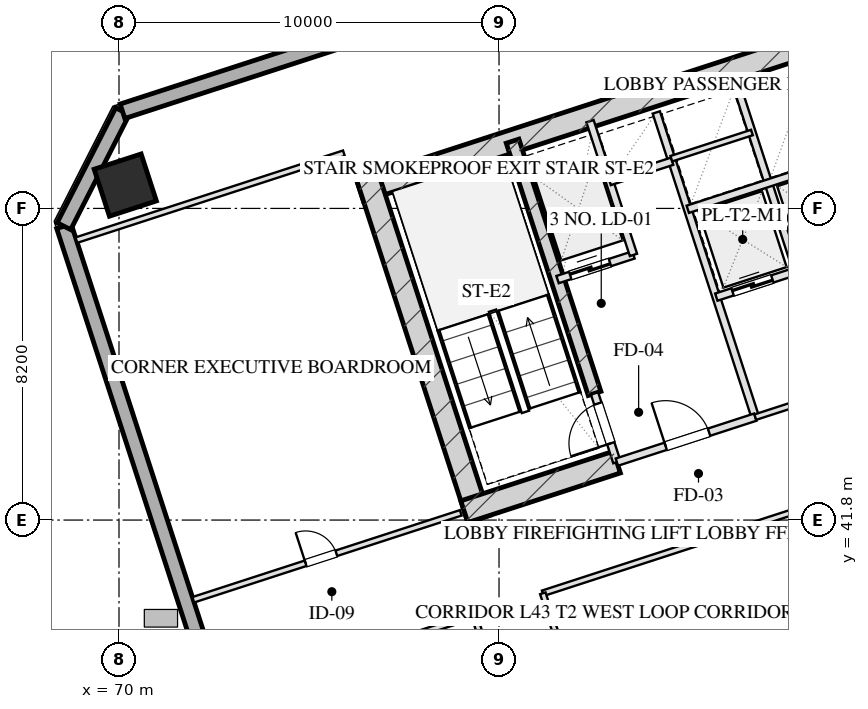
"""IFC4 building model, lengths in metres.
Left out: names, types, materials, properties, quantities, classifications, styles, units other than length and angle.
Written with IfcOpenShell. Run it as: python <this file> out.ifc"""

import sys

from ifc_helpers import new_model, si_unit, direction, frame, frame_2d, origin, origin_2d, place, context, subcontext, project, spatial, rectangle, hollow_rectangle, extrude, element, fill, save


model = new_model("IFC4")
c1 = context("Model", 3, precision=1e-05, world=origin(), true_north=direction((0.0, 1.0)))
c2 = subcontext(c1, "Body", "Model", "MODEL_VIEW")
j1 = project(units=[si_unit("LENGTHUNIT", "METRE"), si_unit("PLANEANGLEUNIT", "RADIAN")], contexts=[c1])
p1 = place(None, origin())
s1 = spatial("IfcSite", under=j1, at=p1, CompositionType="ELEMENT")
p2 = place(p1, origin())
s2 = spatial("IfcBuilding", under=s1, at=p2, CompositionType="ELEMENT")
p3 = place(p2, frame((0.0, 0.0, 163.3)))
s3 = spatial("IfcBuildingStorey", under=s2, at=p3, CompositionType="ELEMENT", Elevation=163.3)
p4 = place(p3, frame((76.344, 50.466, 0.0), z_axis=(0.0, 0.0, 1.0), x_axis=(0.951055727519, 0.309019421968, 0.0)))
e1 = element("IfcWall", 1, at=p4, inside=s3, PredefinedType="SHEAR", context=c2, shape_type="SweptSolid", body=[
    extrude(rectangle(XDim=16.4, YDim=0.6, at=frame_2d((8.2, 0.0))), origin(), (0.0, 0.0, 1.0), 3.45),
])
p5 = place(p3, frame((79.466, 41.828, 0.0), z_axis=(0.0, 0.0, 1.0), x_axis=(-0.309041232772, 0.951048640421, 0.0)))
e2 = element("IfcWall", 2, at=p5, inside=s3, PredefinedType="SHEAR", context=c2, shape_type="SweptSolid", body=[
    extrude(rectangle(XDim=9.48, YDim=0.6, at=frame_2d((4.74, 0.0))), origin(), (0.0, 0.0, 1.0), 3.45),
])
p6 = place(p3, frame((82.514, 45.131, 0.0), z_axis=(0.0, 0.0, 1.0), x_axis=(-0.308988790936, 0.951065679686, 0.0)))
e3 = element("IfcWall", 3, at=p6, inside=s3, PredefinedType="SHEAR", context=c2, shape_type="SweptSolid", body=[
    extrude(rectangle(XDim=6.98, YDim=0.35, at=frame_2d((3.49, 0.0))), origin(), (0.0, 0.0, 1.0), 3.45),
])
p7 = place(p3, frame((79.087, 42.021, 0.0), z_axis=(0.0, 0.0, 1.0), x_axis=(0.951062550203, 0.3089984233, 0.0)))
e4 = element("IfcWall", 4, at=p7, inside=s3, PredefinedType="SHEAR", context=c2, shape_type="SweptSolid", body=[
    extrude(rectangle(XDim=4.22, YDim=0.6, at=frame_2d((2.11, 0.0))), origin(), (0.0, 0.0, 1.0), 3.45),
])
p8 = place(p3, frame((70.165, 50.614, 0.0), z_axis=(0.0, 0.0, 1.0), x_axis=(0.951056516295, 0.309016994375, 0.0)))
e5 = element("IfcColumn", 5, at=p8, inside=s3, PredefinedType="COLUMN", context=c2, shape_type="SweptSolid", body=[
    extrude(hollow_rectangle(XDim=1.3, YDim=1.3, WallThickness=0.045, at=origin_2d()), origin(), (0.0, 0.0, 1.0), 3.451),
])
p9 = place(p3, frame((81.776, 8.827, 0.0), z_axis=(0.0, 0.0, 1.0), x_axis=(-0.309014228706, 0.951057414911, 0.0)))
e6 = element("IfcWall", 6, at=p9, inside=s3, PredefinedType="SOLIDWALL", context=c2, shape_type="SweptSolid", body=[
    extrude(rectangle(XDim=42.8, YDim=0.4, at=frame_2d((21.4, 0.0))), origin(), (0.0, 0.0, 1.0), 2.61),
])
p10 = place(p9, frame((23.45, 0.0, 0.0)))
e7 = element("IfcOpeningElement", 7, at=p10, cuts=e6, PredefinedType="OPENING", context=c2, shape_type="SweptSolid", body=[
    extrude(rectangle(XDim=1.1, YDim=2.15, at=frame_2d((0.55, 1.075))), frame((0.0, 0.21, 0.0), z_axis=(0.0, -1.0, 0.0), x_axis=(1.0, 0.0, 0.0)), (0.0, 0.0, 1.0), 0.42),
])
p11 = place(p3, frame((68.551, 49.532, 0.0), z_axis=(0.0, 0.0, 1.0), x_axis=(0.454019523198, 0.890991735402, 0.0)))
e8 = element("IfcWall", 8, at=p11, inside=s3, PredefinedType="SOLIDWALL", context=c2, shape_type="SweptSolid", body=[
    extrude(rectangle(XDim=3.394, YDim=0.4, at=frame_2d((1.697, 0.0))), origin(), (0.0, 0.0, 1.0), 2.61),
])
p12 = place(p3, frame((70.092, 52.556, 0.0), z_axis=(0.0, 0.0, 1.0), x_axis=(0.951057580055, 0.30901372044, 0.0)))
e9 = element("IfcWall", 9, at=p12, inside=s3, PredefinedType="SOLIDWALL", context=c2, shape_type="SweptSolid", body=[
    extrude(rectangle(XDim=26.4, YDim=0.4, at=frame_2d((13.2, 0.0))), origin(), (0.0, 0.0, 1.0), 2.61),
])
p13 = place(p3, frame((83.101, 43.324, 0.0), z_axis=(0.0, 0.0, 1.0), x_axis=(-0.309048298632, 0.951046344356, 0.0)))
e10 = element("IfcWall", 10, at=p13, inside=s3, PredefinedType="PARTITIONING", context=c2, shape_type="SweptSolid", body=[
    extrude(rectangle(XDim=1.9, YDim=0.2, at=frame_2d((0.95, 0.0))), origin(), (0.0, 0.0, 1.0), 3.175),
])
p14 = place(p13, frame((0.52, 0.0, 0.0)))
e11 = element("IfcOpeningElement", 11, at=p14, cuts=e10, PredefinedType="OPENING", context=c2, shape_type="SweptSolid", body=[
    extrude(rectangle(XDim=1.1, YDim=2.05, at=frame_2d((0.55, 1.025))), frame((0.0, 0.11, 0.0), z_axis=(0.0, -1.0, 0.0), x_axis=(1.0, 0.0, 0.0)), (0.0, 0.0, 1.0), 0.22),
])
p15 = place(p3, frame((86.743, 44.508, 0.0), z_axis=(0.0, 0.0, 1.0), x_axis=(-0.309016001439, 0.951056838919, 0.0)))
e12 = element("IfcWall", 12, at=p15, inside=s3, PredefinedType="PARTITIONING", context=c2, shape_type="SweptSolid", body=[
    extrude(rectangle(XDim=8.43, YDim=0.2, at=frame_2d((4.215, 0.0))), origin(), (0.0, 0.0, 1.0), 3.175),
])
p16 = place(p3, frame((83.101, 43.324, 0.0), z_axis=(0.0, 0.0, 1.0), x_axis=(0.951052804469, 0.309028417967, 0.0)))
e13 = element("IfcWall", 13, at=p16, inside=s3, PredefinedType="PARTITIONING", context=c2, shape_type="SweptSolid", body=[
    extrude(rectangle(XDim=3.83, YDim=0.2, at=frame_2d((1.915, 0.0))), origin(), (0.0, 0.0, 1.0), 3.175),
])
p17 = place(p16, frame((1.35, 0.0, 0.0)))
e14 = element("IfcOpeningElement", 14, at=p17, cuts=e13, PredefinedType="OPENING", context=c2, shape_type="SweptSolid", body=[
    extrude(rectangle(XDim=1.2, YDim=2.05, at=frame_2d((0.6, 1.025))), frame((0.0, 0.11, 0.0), z_axis=(0.0, -1.0, 0.0), x_axis=(1.0, 0.0, 0.0)), (0.0, 0.0, 1.0), 0.22),
])
p18 = place(p3, frame((81.54, 48.127, 0.0), z_axis=(0.0, 0.0, 1.0), x_axis=(0.951062257173, 0.308999325213, 0.0)))
e15 = element("IfcWall", 15, at=p18, inside=s3, PredefinedType="PARTITIONING", context=c2, shape_type="SweptSolid", body=[
    extrude(rectangle(XDim=2.1, YDim=0.2, at=frame_2d((1.05, 0.0))), origin(), (0.0, 0.0, 1.0), 3.175),
])
p19 = place(p18, frame((0.35, 0.0, 0.0)))
e16 = element("IfcOpeningElement", 16, at=p19, cuts=e15, PredefinedType="OPENING", context=c2, shape_type="SweptSolid", body=[
    extrude(rectangle(XDim=1.1, YDim=2.05, at=frame_2d((0.55, 1.025))), frame((0.0, 0.11, 0.0), z_axis=(0.0, -1.0, 0.0), x_axis=(1.0, 0.0, 0.0)), (0.0, 0.0, 1.0), 0.22),
])
p20 = place(p3, frame((83.538, 48.776, 0.0), z_axis=(0.0, 0.0, 1.0), x_axis=(-0.3089935693, 0.951064127245, 0.0)))
e17 = element("IfcWall", 17, at=p20, inside=s3, PredefinedType="PARTITIONING", context=c2, shape_type="SweptSolid", body=[
    extrude(rectangle(XDim=3.7, YDim=0.2, at=frame_2d((1.85, 0.0))), origin(), (0.0, 0.0, 1.0), 3.175),
])
p21 = place(p3, frame((82.91, 50.707, 0.0), z_axis=(0.0, 0.0, 1.0), x_axis=(0.951041328149, 0.309063734775, 0.0)))
e18 = element("IfcWall", 18, at=p21, inside=s3, PredefinedType="PARTITIONING", context=c2, shape_type="SweptSolid", body=[
    extrude(rectangle(XDim=1.73, YDim=0.2, at=frame_2d((0.865, 0.0))), origin(), (0.0, 0.0, 1.0), 3.175),
])
p22 = place(p3, frame((86.743, 44.508, 0.0), z_axis=(0.0, 0.0, 1.0), x_axis=(0.951063829732, 0.308994485023, 0.0)))
e19 = element("IfcWall", 19, at=p22, inside=s3, PredefinedType="PARTITIONING", context=c2, shape_type="SweptSolid", body=[
    extrude(rectangle(XDim=4.4, YDim=0.15, at=frame_2d((2.2, 0.0))), origin(), (0.0, 0.0, 1.0), 3.175),
])
p23 = place(p22, frame((1.45, 0.0, 0.0)))
e20 = element("IfcOpeningElement", 20, at=p23, cuts=e19, PredefinedType="OPENING", context=c2, shape_type="SweptSolid", body=[
    extrude(rectangle(XDim=1.5, YDim=2.05, at=frame_2d((0.75, 1.025))), frame((0.0, 0.085, 0.0), z_axis=(0.0, -1.0, 0.0), x_axis=(1.0, 0.0, 0.0)), (0.0, 0.0, 1.0), 0.17),
])
p24 = place(p3, frame((85.718, 47.666, 0.0), z_axis=(0.0, 0.0, 1.0), x_axis=(0.951058531764, 0.30901079133, 0.0)))
e21 = element("IfcWall", 21, at=p24, inside=s3, PredefinedType="PARTITIONING", context=c2, shape_type="SweptSolid", body=[
    extrude(rectangle(XDim=4.4, YDim=0.2, at=frame_2d((2.2, 0.0))), origin(), (0.0, 0.0, 1.0), 3.175),
])
p25 = place(p24, frame((0.45, 0.0, 0.0)))
e22 = element("IfcOpeningElement", 22, at=p25, cuts=e21, PredefinedType="OPENING", context=c2, shape_type="SweptSolid", body=[
    extrude(rectangle(XDim=1.1, YDim=2.05, at=frame_2d((0.55, 1.025))), frame((0.0, 0.11, 0.0), z_axis=(0.0, -1.0, 0.0), x_axis=(1.0, 0.0, 0.0)), (0.0, 0.0, 1.0), 0.22),
])
p26 = place(p24, frame((2.55, 0.0, 0.0)))
e23 = element("IfcOpeningElement", 23, at=p26, cuts=e21, PredefinedType="OPENING", context=c2, shape_type="SweptSolid", body=[
    extrude(rectangle(XDim=1.1, YDim=2.05, at=frame_2d((0.55, 1.025))), frame((0.0, 0.11, 0.0), z_axis=(0.0, -1.0, 0.0), x_axis=(1.0, 0.0, 0.0)), (0.0, 0.0, 1.0), 0.22),
])
p27 = place(p3, frame((87.838, 48.354, 0.0), z_axis=(0.0, 0.0, 1.0), x_axis=(-0.3090093719, 0.951058992953, 0.0)))
e24 = element("IfcWall", 24, at=p27, inside=s3, PredefinedType="PARTITIONING", context=c2, shape_type="SweptSolid", body=[
    extrude(rectangle(XDim=5.11, YDim=0.2, at=frame_2d((2.555, 0.0))), origin(), (0.0, 0.0, 1.0), 3.175),
])
p28 = place(p3, frame((84.967, 49.977, 0.0), z_axis=(0.0, 0.0, 1.0), x_axis=(0.951063829732, 0.308994485023, 0.0)))
e25 = element("IfcWall", 25, at=p28, inside=s3, PredefinedType="PARTITIONING", context=c2, shape_type="SweptSolid", body=[
    extrude(rectangle(XDim=4.4, YDim=0.2, at=frame_2d((2.2, 0.0))), origin(), (0.0, 0.0, 1.0), 3.175),
])
p29 = place(p3, frame((84.534, 51.308, 0.0), z_axis=(0.0, 0.0, 1.0), x_axis=(0.951075093106, 0.308959814982, 0.0)))
e26 = element("IfcWall", 26, at=p29, inside=s3, PredefinedType="PARTITIONING", context=c2, shape_type="SweptSolid", body=[
    extrude(rectangle(XDim=2.23, YDim=0.15, at=frame_2d((1.115, 0.0))), origin(), (0.0, 0.0, 1.0), 3.175),
])
p30 = place(p3, frame((68.88, 49.166, 0.0), z_axis=(0.0, 0.0, 1.0), x_axis=(0.951060977215, 0.309003264738, 0.0)))
e27 = element("IfcWall", 27, at=p30, inside=s3, PredefinedType="PARTITIONING", context=c2, shape_type="SweptSolid", body=[
    extrude(rectangle(XDim=7.4, YDim=0.15, at=frame_2d((3.7, 0.0))), origin(), (0.0, 0.0, 1.0), 3.175),
])
p31 = place(p3, frame((71.955, 39.703, 0.0), z_axis=(0.0, 0.0, 1.0), x_axis=(0.951060977215, 0.309003264738, 0.0)))
e28 = element("IfcWall", 28, at=p31, inside=s3, PredefinedType="PARTITIONING", context=c2, shape_type="SweptSolid", body=[
    extrude(rectangle(XDim=7.4, YDim=0.15, at=frame_2d((3.7, 0.0))), origin(), (0.0, 0.0, 1.0), 3.175),
])
p32 = place(p31, frame((3.108, 0.0, 0.0)))
e29 = element("IfcOpeningElement", 29, at=p32, cuts=e28, PredefinedType="OPENING", context=c2, shape_type="SweptSolid", body=[
    extrude(rectangle(XDim=0.85, YDim=2.05, at=frame_2d((0.425, 1.025))), frame((0.0, 0.085, 0.0), z_axis=(0.0, -1.0, 0.0), x_axis=(1.0, 0.0, 0.0)), (0.0, 0.0, 1.0), 0.17),
])
p33 = place(p3, frame((72.783, 37.154, 0.0), z_axis=(0.0, 0.0, 1.0), x_axis=(0.951051488548, 0.309032467762, 0.0)))
e30 = element("IfcWall", 30, at=p33, inside=s3, PredefinedType="PARTITIONING", context=c2, shape_type="SweptSolid", body=[
    extrude(rectangle(XDim=6.9, YDim=0.15, at=frame_2d((3.45, 0.0))), origin(), (0.0, 0.0, 1.0), 3.175),
])
p34 = place(p3, frame((81.152, 39.873, 0.0), z_axis=(0.0, 0.0, 1.0), x_axis=(0.951057640494, 0.309013534425, 0.0)))
e31 = element("IfcWall", 31, at=p34, inside=s3, PredefinedType="PARTITIONING", context=c2, shape_type="SweptSolid", body=[
    extrude(rectangle(XDim=8.6, YDim=0.15, at=frame_2d((4.3, 0.0))), origin(), (0.0, 0.0, 1.0), 3.175),
])
p35 = place(p3, frame((84.487, 23.46, 0.0), z_axis=(0.0, 0.0, 1.0), x_axis=(-0.30901773025, 0.951056277195, 0.0)))
e32 = element("IfcWall", 32, at=p35, inside=s3, PredefinedType="PARTITIONING", context=c2, shape_type="SweptSolid", body=[
    extrude(rectangle(XDim=16.64, YDim=0.15, at=frame_2d((8.32, 0.0))), origin(), (0.0, 0.0, 1.0), 3.175),
])
p36 = place(p35, frame((1.16, 0.0, 0.0)))
e33 = element("IfcOpeningElement", 33, at=p36, cuts=e32, PredefinedType="OPENING", context=c2, shape_type="SweptSolid", body=[
    extrude(rectangle(XDim=1.0, YDim=2.05, at=frame_2d((0.5, 1.025))), frame((0.0, 0.085, 0.0), z_axis=(0.0, -1.0, 0.0), x_axis=(1.0, 0.0, 0.0)), (0.0, 0.0, 1.0), 0.17),
])
p37 = place(p35, frame((4.72, 0.0, 0.0)))
e34 = element("IfcOpeningElement", 34, at=p37, cuts=e32, PredefinedType="OPENING", context=c2, shape_type="SweptSolid", body=[
    extrude(rectangle(XDim=1.0, YDim=2.05, at=frame_2d((0.5, 1.025))), frame((0.0, 0.085, 0.0), z_axis=(0.0, -1.0, 0.0), x_axis=(1.0, 0.0, 0.0)), (0.0, 0.0, 1.0), 0.17),
])
p38 = place(p35, frame((7.56, 0.0, 0.0)))
e35 = element("IfcOpeningElement", 35, at=p38, cuts=e32, PredefinedType="OPENING", context=c2, shape_type="SweptSolid", body=[
    extrude(rectangle(XDim=1.0, YDim=2.05, at=frame_2d((0.5, 1.025))), frame((0.0, 0.085, 0.0), z_axis=(0.0, -1.0, 0.0), x_axis=(1.0, 0.0, 0.0)), (0.0, 0.0, 1.0), 0.17),
])
p39 = place(p35, frame((10.16, 0.0, 0.0)))
e36 = element("IfcOpeningElement", 36, at=p39, cuts=e32, PredefinedType="OPENING", context=c2, shape_type="SweptSolid", body=[
    extrude(rectangle(XDim=1.05, YDim=2.05, at=frame_2d((0.525, 1.025))), frame((0.0, 0.085, 0.0), z_axis=(0.0, -1.0, 0.0), x_axis=(1.0, 0.0, 0.0)), (0.0, 0.0, 1.0), 0.17),
])
p40 = place(p35, frame((14.48, 0.0, 0.0)))
e37 = element("IfcOpeningElement", 37, at=p40, cuts=e32, PredefinedType="OPENING", context=c2, shape_type="SweptSolid", body=[
    extrude(rectangle(XDim=1.0, YDim=2.05, at=frame_2d((0.5, 1.025))), frame((0.0, 0.085, 0.0), z_axis=(0.0, -1.0, 0.0), x_axis=(1.0, 0.0, 0.0)), (0.0, 0.0, 1.0), 0.17),
])
p41 = place(p3, frame((86.294, 24.048, 0.0), z_axis=(0.0, 0.0, 1.0), x_axis=(-0.309004459387, 0.951060589068, 0.0)))
e38 = element("IfcWall", 38, at=p41, inside=s3, PredefinedType="PARTITIONING", context=c2, shape_type="SweptSolid", body=[
    extrude(rectangle(XDim=16.64, YDim=0.15, at=frame_2d((8.32, 0.0))), origin(), (0.0, 0.0, 1.0), 3.175),
])
p42 = place(p41, frame((4.284, 0.0, 0.0)))
e39 = element("IfcOpeningElement", 39, at=p42, cuts=e38, PredefinedType="OPENING", context=c2, shape_type="SweptSolid", body=[
    extrude(rectangle(XDim=1.1, YDim=2.05, at=frame_2d((0.55, 1.025))), frame((0.0, 0.085, 0.0), z_axis=(0.0, -1.0, 0.0), x_axis=(1.0, 0.0, 0.0)), (0.0, 0.0, 1.0), 0.17),
])
p43 = place(p41, frame((12.724, 0.0, 0.0)))
e40 = element("IfcOpeningElement", 40, at=p43, cuts=e38, PredefinedType="OPENING", context=c2, shape_type="SweptSolid", body=[
    extrude(rectangle(XDim=1.1, YDim=2.05, at=frame_2d((0.55, 1.025))), frame((0.0, 0.085, 0.0), z_axis=(0.0, -1.0, 0.0), x_axis=(1.0, 0.0, 0.0)), (0.0, 0.0, 1.0), 0.17),
])
p44 = place(p14, origin())
e41 = element("IfcDoor", 41, at=p44, inside=s3, OperationType="SINGLE_SWING_LEFT", PredefinedType="DOOR", context=c2, shape_type="SweptSolid", body=[
    extrude(rectangle(XDim=1.1, YDim=2.05, at=frame_2d((0.55, 1.025))), frame((0.0, 0.025, 0.0), z_axis=(0.0, -1.0, 0.0), x_axis=(1.0, 0.0, 0.0)), (0.0, 0.0, 1.0), 0.05),
])
fill(e11, e41)
p45 = place(p17, origin())
e42 = element("IfcDoor", 42, at=p45, inside=s3, OperationType="SINGLE_SWING_LEFT", PredefinedType="DOOR", context=c2, shape_type="SweptSolid", body=[
    extrude(rectangle(XDim=1.2, YDim=2.05, at=frame_2d((0.6, 1.025))), frame((0.0, 0.025, 0.0), z_axis=(0.0, -1.0, 0.0), x_axis=(1.0, 0.0, 0.0)), (0.0, 0.0, 1.0), 0.05),
])
fill(e14, e42)
p46 = place(p19, origin())
e43 = element("IfcDoor", 43, at=p46, inside=s3, OperationType="DOUBLE_DOOR_SLIDING", PredefinedType="DOOR", context=c2, shape_type="SweptSolid", body=[
    extrude(rectangle(XDim=1.1, YDim=2.05, at=frame_2d((0.55, 1.025))), frame((0.0, 0.025, 0.0), z_axis=(0.0, -1.0, 0.0), x_axis=(1.0, 0.0, 0.0)), (0.0, 0.0, 1.0), 0.05),
])
fill(e16, e43)
p47 = place(p25, origin())
e44 = element("IfcDoor", 44, at=p47, inside=s3, OperationType="DOUBLE_DOOR_SLIDING", PredefinedType="DOOR", context=c2, shape_type="SweptSolid", body=[
    extrude(rectangle(XDim=1.1, YDim=2.05, at=frame_2d((0.55, 1.025))), frame((0.0, 0.025, 0.0), z_axis=(0.0, -1.0, 0.0), x_axis=(1.0, 0.0, 0.0)), (0.0, 0.0, 1.0), 0.05),
])
fill(e22, e44)
p48 = place(p32, origin())
e45 = element("IfcDoor", 45, at=p48, inside=s3, OperationType="SINGLE_SWING_LEFT", PredefinedType="DOOR", context=c2, shape_type="SweptSolid", body=[
    extrude(rectangle(XDim=0.85, YDim=2.05, at=frame_2d((0.425, 1.025))), frame((0.0, 0.025, 0.0), z_axis=(0.0, -1.0, 0.0), x_axis=(1.0, 0.0, 0.0)), (0.0, 0.0, 1.0), 0.05),
])
fill(e29, e45)
save(model, sys.argv[1])
